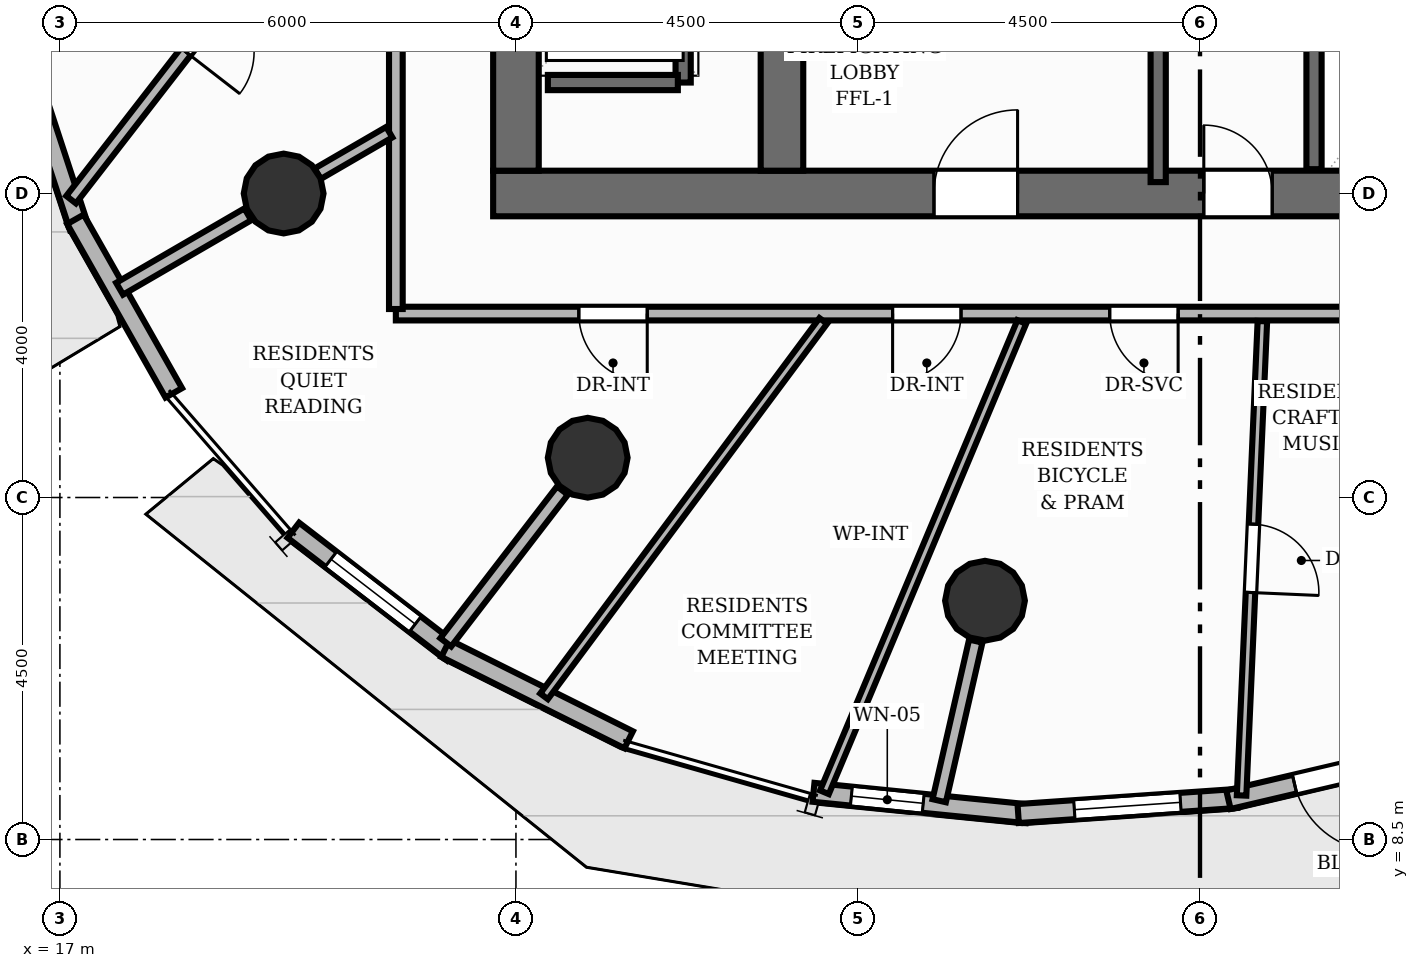
"""IFC4 building model, lengths in metres.
Left out: names, types, materials, properties, quantities, classifications, styles, units other than length and angle.
Written with IfcOpenShell. Run it as: python <this file> out.ifc"""

import sys

from ifc_helpers import new_model, si_unit, direction, frame, frame_2d, origin, origin_2d, place, context, subcontext, project, spatial, rectangle, circle, extrude, element, fill, save


model = new_model("IFC4")
c1 = context("Model", 3, precision=1e-05, world=origin(), true_north=direction((0.0, 1.0)))
c2 = subcontext(c1, "Body", "Model", "MODEL_VIEW")
j1 = project(units=[si_unit("LENGTHUNIT", "METRE"), si_unit("PLANEANGLEUNIT", "RADIAN")], contexts=[c1])
p1 = place(None, origin())
s1 = spatial("IfcSite", under=j1, at=p1, CompositionType="ELEMENT")
p2 = place(p1, origin())
s2 = spatial("IfcBuilding", under=s1, at=p2, CompositionType="ELEMENT")
p3 = place(p2, frame((0.0, 0.0, 148.96)))
s3 = spatial("IfcBuildingStorey", under=s2, at=p3, CompositionType="ELEMENT", Elevation=148.96)
p4 = place(p3, frame((22.7, 17.0, 0.0), z_axis=(0.0, 0.0, 1.0), x_axis=(1.0, 0.0, 0.0)))
e1 = element("IfcWall", 1, at=p4, inside=s3, PredefinedType="SHEAR", context=c2, shape_type="SweptSolid", body=[
    extrude(rectangle(XDim=15.1, YDim=0.6, at=frame_2d((7.55, 0.0))), origin(), (0.0, 0.0, 1.0), 3.2),
])
p5 = place(p4, frame((5.8, 0.0, 0.0)))
e2 = element("IfcOpeningElement", 2, at=p5, cuts=e1, PredefinedType="OPENING", context=c2, shape_type="SweptSolid", body=[
    extrude(rectangle(XDim=1.1, YDim=2.15, at=frame_2d((0.55, 1.075))), frame((0.0, 0.31, 0.0), z_axis=(0.0, -1.0, 0.0), x_axis=(1.0, 0.0, 0.0)), (0.0, 0.0, 1.0), 0.62),
])
p6 = place(p4, frame((9.35, 0.0, 0.0)))
e3 = element("IfcOpeningElement", 3, at=p6, cuts=e1, PredefinedType="OPENING", context=c2, shape_type="SweptSolid", body=[
    extrude(rectangle(XDim=0.9, YDim=2.1, at=frame_2d((0.45, 1.05))), frame((0.0, 0.31, 0.0), z_axis=(0.0, -1.0, 0.0), x_axis=(1.0, 0.0, 0.0)), (0.0, 0.0, 1.0), 0.62),
])
p7 = place(p3, frame((23.0, 17.3, 0.0), z_axis=(0.0, 0.0, 1.0), x_axis=(0.0, 1.0, 0.0)))
e4 = element("IfcWall", 4, at=p7, inside=s3, PredefinedType="SHEAR", context=c2, shape_type="SweptSolid", body=[
    extrude(rectangle(XDim=13.4, YDim=0.6, at=frame_2d((6.7, 0.0))), origin(), (0.0, 0.0, 1.0), 3.2),
])
p8 = place(p7, frame((1.675, 0.0, 0.0)))
e5 = element("IfcOpeningElement", 5, at=p8, cuts=e4, PredefinedType="OPENING", context=c2, shape_type="SweptSolid", body=[
    extrude(rectangle(XDim=1.05, YDim=2.15, at=frame_2d((0.525, 1.075))), frame((0.0, 0.31, 0.0), z_axis=(0.0, -1.0, 0.0), x_axis=(1.0, 0.0, 0.0)), (0.0, 0.0, 1.0), 0.62),
])
p9 = place(p7, frame((6.175, 0.0, 0.0)))
e6 = element("IfcOpeningElement", 6, at=p9, cuts=e4, PredefinedType="OPENING", context=c2, shape_type="SweptSolid", body=[
    extrude(rectangle(XDim=1.05, YDim=2.15, at=frame_2d((0.525, 1.075))), frame((0.0, 0.31, 0.0), z_axis=(0.0, -1.0, 0.0), x_axis=(1.0, 0.0, 0.0)), (0.0, 0.0, 1.0), 0.62),
])
p10 = place(p7, frame((10.675, 0.0, 0.0)))
e7 = element("IfcOpeningElement", 7, at=p10, cuts=e4, PredefinedType="OPENING", context=c2, shape_type="SweptSolid", body=[
    extrude(rectangle(XDim=1.05, YDim=2.15, at=frame_2d((0.525, 1.075))), frame((0.0, 0.31, 0.0), z_axis=(0.0, -1.0, 0.0), x_axis=(1.0, 0.0, 0.0)), (0.0, 0.0, 1.0), 0.62),
])
p11 = place(p3, frame((26.5, 17.3, 0.0), z_axis=(0.0, 0.0, 1.0), x_axis=(0.0, 1.0, 0.0)))
e8 = element("IfcWall", 8, at=p11, inside=s3, PredefinedType="SHEAR", context=c2, shape_type="SweptSolid", body=[
    extrude(rectangle(XDim=13.4, YDim=0.56, at=frame_2d((6.7, 0.0))), origin(), (0.0, 0.0, 1.0), 3.2),
])
for number, where, z_axis, x_axis in (
    (9, (19.944, 17.0, 0.0), (0.0, 0.0, 1.0), (1.0, 0.0, 0.0)),
    (10, (23.944, 13.523, 0.0), (0.0, 0.0, 1.0), (1.0, 0.0, 0.0)),
    (11, (29.171, 11.642, 0.0), (0.0, 0.0, 1.0), (1.0, 0.0, 0.0)),
):
    element("IfcColumn", number, at=place(p3, frame(where, z_axis=z_axis, x_axis=x_axis)), inside=s3, PredefinedType="COLUMN", context=c2, shape_type="SweptSolid", body=[
        extrude(circle(Radius=0.525, at=origin_2d()), origin(), (0.0, 0.0, 1.0), 3.2),
    ])
p12 = place(p3, frame((17.251, 16.556, 0.0), z_axis=(0.0, 0.0, 1.0), x_axis=(-0.311522010952, 0.950238936633, 0.0)))
e12 = element("IfcWall", 12, at=p12, inside=s3, PredefinedType="SOLIDWALL", context=c2, shape_type="SweptSolid", body=[
    extrude(rectangle(XDim=2.648, YDim=0.25, at=frame_2d((1.324, 0.0))), origin(), (0.0, 0.0, 1.0), 2.96),
])
p13 = place(p3, frame((18.498, 14.377, 0.0), z_axis=(0.0, 0.0, 1.0), x_axis=(-0.492909281161, 0.870080709214, 0.0)))
e13 = element("IfcWall", 13, at=p13, inside=s3, PredefinedType="SOLIDWALL", context=c2, shape_type="SweptSolid", body=[
    extrude(rectangle(XDim=2.624, YDim=0.25, at=frame_2d((1.312, 0.0))), origin(), (0.0, 0.0, 1.0), 2.96),
])
p14 = place(p3, frame((22.169, 10.954, 0.0), z_axis=(0.0, 0.0, 1.0), x_axis=(-0.7923805969, 0.610027040103, 0.0)))
e14 = element("IfcWall", 14, at=p14, inside=s3, PredefinedType="SOLIDWALL", context=c2, shape_type="SweptSolid", body=[
    extrude(rectangle(XDim=2.648, YDim=0.25, at=frame_2d((1.324, 0.0))), origin(), (0.0, 0.0, 1.0), 2.96),
])
p15 = place(p14, frame((0.624, 0.0, 0.85)))
e15 = element("IfcOpeningElement", 15, at=p15, cuts=e14, PredefinedType="OPENING", context=c2, shape_type="SweptSolid", body=[
    extrude(rectangle(XDim=1.4, YDim=1.55, at=frame_2d((0.7, 0.775))), frame((0.0, 0.135, 0.0), z_axis=(0.0, -1.0, 0.0), x_axis=(1.0, 0.0, 0.0)), (0.0, 0.0, 1.0), 0.27),
])
p16 = place(p3, frame((24.483, 9.812, 0.0), z_axis=(0.0, 0.0, 1.0), x_axis=(-0.894843809708, 0.446379385979, 0.0)))
e16 = element("IfcWall", 16, at=p16, inside=s3, PredefinedType="SOLIDWALL", context=c2, shape_type="SweptSolid", body=[
    extrude(rectangle(XDim=2.693, YDim=0.25, at=frame_2d((1.347, 0.0))), origin(), (0.0, 0.0, 1.0), 2.96),
])
p17 = place(p3, frame((29.719, 8.84, 0.0), z_axis=(0.0, 0.0, 1.0), x_axis=(-0.995013999105, 0.099735357744, 0.0)))
e17 = element("IfcWall", 17, at=p17, inside=s3, PredefinedType="SOLIDWALL", context=c2, shape_type="SweptSolid", body=[
    extrude(rectangle(XDim=2.818, YDim=0.25, at=frame_2d((1.409, 0.0))), origin(), (0.0, 0.0, 1.0), 2.96),
])
p18 = place(p17, frame((1.367, 0.0, 0.85)))
e18 = element("IfcOpeningElement", 18, at=p18, cuts=e17, PredefinedType="OPENING", context=c2, shape_type="SweptSolid", body=[
    extrude(rectangle(XDim=0.95, YDim=1.45, at=frame_2d((0.475, 0.725))), frame((0.0, 0.135, 0.0), z_axis=(0.0, -1.0, 0.0), x_axis=(1.0, 0.0, 0.0)), (0.0, 0.0, 1.0), 0.27),
])
p19 = place(p3, frame((32.483, 9.04, 0.0), z_axis=(0.0, 0.0, 1.0), x_axis=(-0.997630729469, -0.068796276206, 0.0)))
e19 = element("IfcWall", 19, at=p19, inside=s3, PredefinedType="SOLIDWALL", context=c2, shape_type="SweptSolid", body=[
    extrude(rectangle(XDim=2.882, YDim=0.25, at=frame_2d((1.441, 0.0))), origin(), (0.0, 0.0, 1.0), 2.96),
])
p20 = place(p19, frame((0.741, 0.0, 0.85)))
e20 = element("IfcOpeningElement", 20, at=p20, cuts=e19, PredefinedType="OPENING", context=c2, shape_type="SweptSolid", body=[
    extrude(rectangle(XDim=1.4, YDim=1.55, at=frame_2d((0.7, 0.775))), frame((0.0, 0.135, 0.0), z_axis=(0.0, -1.0, 0.0), x_axis=(1.0, 0.0, 0.0)), (0.0, 0.0, 1.0), 0.27),
])
p21 = place(p3, frame((35.233, 9.695, 0.0), z_axis=(0.0, 0.0, 1.0), x_axis=(-0.973538048261, -0.228524984602, 0.0)))
e21 = element("IfcWall", 21, at=p21, inside=s3, PredefinedType="SOLIDWALL", context=c2, shape_type="SweptSolid", body=[
    extrude(rectangle(XDim=2.937, YDim=0.25, at=frame_2d((1.468, 0.0))), origin(), (0.0, 0.0, 1.0), 2.96),
])
p22 = place(p21, frame((0.893, 0.0, 0.0)))
e22 = element("IfcOpeningElement", 22, at=p22, cuts=e21, PredefinedType="OPENING", context=c2, shape_type="SweptSolid", body=[
    extrude(rectangle(XDim=1.15, YDim=2.2, at=frame_2d((0.575, 1.1))), frame((0.0, 0.135, 0.0), z_axis=(0.0, -1.0, 0.0), x_axis=(1.0, 0.0, 0.0)), (0.0, 0.0, 1.0), 0.27),
])
p23 = place(p3, frame((31.45, 17.15, 0.0), z_axis=(0.0, 0.0, 1.0), x_axis=(0.0, 1.0, 0.0)))
e23 = element("IfcWall", 23, at=p23, inside=s3, PredefinedType="SHEAR", context=c2, shape_type="SweptSolid", body=[
    extrude(rectangle(XDim=3.5, YDim=0.2, at=frame_2d((1.75, 0.0))), origin(), (0.0, 0.0, 1.0), 3.2),
])
p24 = place(p3, frame((25.2, 18.46, 0.0), z_axis=(0.0, 0.0, 1.0), x_axis=(0.0, 1.0, 0.0)))
e24 = element("IfcWall", 24, at=p24, inside=s3, PredefinedType="SHEAR", context=c2, shape_type="SweptSolid", body=[
    extrude(rectangle(XDim=11.08, YDim=0.2, at=frame_2d((5.54, 0.0))), origin(), (0.0, 0.0, 1.0), 3.2),
])
p25 = place(p3, frame((23.42, 18.46, 0.0), z_axis=(0.0, 0.0, 1.0), x_axis=(1.0, 0.0, 0.0)))
e25 = element("IfcWall", 25, at=p25, inside=s3, PredefinedType="SHEAR", context=c2, shape_type="SweptSolid", body=[
    extrude(rectangle(XDim=1.71, YDim=0.2, at=frame_2d((0.855, 0.0))), origin(), (0.0, 0.0, 1.0), 3.2),
])
p26 = place(p3, frame((33.5, 17.32, 0.0), z_axis=(0.0, 0.0, 1.0), x_axis=(0.0, 1.0, 0.0)))
e26 = element("IfcWall", 26, at=p26, inside=s3, PredefinedType="SHEAR", context=c2, shape_type="SweptSolid", body=[
    extrude(rectangle(XDim=1.86, YDim=0.2, at=frame_2d((0.93, 0.0))), origin(), (0.0, 0.0, 1.0), 3.2),
])
p27 = place(p3, frame((19.472, 16.726, 0.0), z_axis=(0.0, 0.0, 1.0), x_axis=(-0.864802971131, -0.502111363268, 0.0)))
e27 = element("IfcWall", 27, at=p27, inside=s3, PredefinedType="PARTITIONING", context=c2, shape_type="SweptSolid", body=[
    extrude(rectangle(XDim=1.951, YDim=0.18, at=frame_2d((0.975, 0.0))), origin(), (0.0, 0.0, 1.0), 2.336),
])
p28 = place(p3, frame((23.612, 13.092, 0.0), z_axis=(0.0, 0.0, 1.0), x_axis=(-0.609556175004, -0.792742877303, 0.0)))
e28 = element("IfcWall", 28, at=p28, inside=s3, PredefinedType="PARTITIONING", context=c2, shape_type="SweptSolid", body=[
    extrude(rectangle(XDim=2.519, YDim=0.18, at=frame_2d((1.259, 0.0))), origin(), (0.0, 0.0, 1.0), 2.336),
])
p29 = place(p3, frame((29.05, 11.111, 0.0), z_axis=(0.0, 0.0, 1.0), x_axis=(-0.223080127706, -0.974800111111, 0.0)))
e29 = element("IfcWall", 29, at=p29, inside=s3, PredefinedType="PARTITIONING", context=c2, shape_type="SweptSolid", body=[
    extrude(rectangle(XDim=2.155, YDim=0.18, at=frame_2d((1.077, 0.0))), origin(), (0.0, 0.0, 1.0), 2.336),
])
p30 = place(p3, frame((39.08, 15.42, 0.0), z_axis=(0.0, 0.0, 1.0), x_axis=(-1.0, 0.0, 0.0)))
e30 = element("IfcWall", 30, at=p30, inside=s3, PredefinedType="PARTITIONING", context=c2, shape_type="SweptSolid", body=[
    extrude(rectangle(XDim=17.66, YDim=0.18, at=frame_2d((8.83, 0.0))), origin(), (0.0, 0.0, 1.0), 2.955),
])
p31 = place(p30, frame((7.368, 0.0, 0.0)))
e31 = element("IfcOpeningElement", 31, at=p31, cuts=e30, PredefinedType="OPENING", context=c2, shape_type="SweptSolid", body=[
    extrude(rectangle(XDim=0.9, YDim=2.1, at=frame_2d((0.45, 1.05))), frame((0.0, 0.1, 0.0), z_axis=(0.0, -1.0, 0.0), x_axis=(1.0, 0.0, 0.0)), (0.0, 0.0, 1.0), 0.2),
])
p32 = place(p30, frame((10.224, 0.0, 0.0)))
e32 = element("IfcOpeningElement", 32, at=p32, cuts=e30, PredefinedType="OPENING", context=c2, shape_type="SweptSolid", body=[
    extrude(rectangle(XDim=0.9, YDim=2.1, at=frame_2d((0.45, 1.05))), frame((0.0, 0.1, 0.0), z_axis=(0.0, -1.0, 0.0), x_axis=(1.0, 0.0, 0.0)), (0.0, 0.0, 1.0), 0.2),
])
p33 = place(p30, frame((14.353, 0.0, 0.0)))
e33 = element("IfcOpeningElement", 33, at=p33, cuts=e30, PredefinedType="OPENING", context=c2, shape_type="SweptSolid", body=[
    extrude(rectangle(XDim=0.9, YDim=2.1, at=frame_2d((0.45, 1.05))), frame((0.0, 0.1, 0.0), z_axis=(0.0, -1.0, 0.0), x_axis=(1.0, 0.0, 0.0)), (0.0, 0.0, 1.0), 0.2),
])
p34 = place(p3, frame((21.42, 15.48, 0.0), z_axis=(0.0, 0.0, 1.0), x_axis=(0.0, 1.0, 0.0)))
e34 = element("IfcWall", 34, at=p34, inside=s3, PredefinedType="PARTITIONING", context=c2, shape_type="SweptSolid", body=[
    extrude(rectangle(XDim=6.12, YDim=0.18, at=frame_2d((3.06, 0.0))), origin(), (0.0, 0.0, 1.0), 2.955),
])
p35 = place(p3, frame((27.059, 9.122, 0.0), z_axis=(0.0, 0.0, 1.0), x_axis=(0.386926287161, 0.922110648623, 0.0)))
e35 = element("IfcWall", 35, at=p35, inside=s3, PredefinedType="PARTITIONING", context=c2, shape_type="SweptSolid", body=[
    extrude(rectangle(XDim=6.71, YDim=0.125, at=frame_2d((3.355, 0.0))), origin(), (0.0, 0.0, 1.0), 2.955),
])
p36 = place(p3, frame((32.821, 15.32, 0.0), z_axis=(0.0, 0.0, 1.0), x_axis=(-0.043813760095, -0.999039716141, 0.0)))
e36 = element("IfcWall", 36, at=p36, inside=s3, PredefinedType="PARTITIONING", context=c2, shape_type="SweptSolid", body=[
    extrude(rectangle(XDim=6.247, YDim=0.125, at=frame_2d((3.123, 0.0))), origin(), (0.0, 0.0, 1.0), 2.692),
])
p37 = place(p36, frame((2.673, 0.0, 0.0)))
e37 = element("IfcOpeningElement", 37, at=p37, cuts=e36, PredefinedType="OPENING", context=c2, shape_type="SweptSolid", body=[
    extrude(rectangle(XDim=0.9, YDim=2.1, at=frame_2d((0.45, 1.05))), frame((0.0, 0.073, 0.0), z_axis=(0.0, -1.0, 0.0), x_axis=(1.0, 0.0, 0.0)), (0.0, 0.0, 1.0), 0.145),
])
p38 = place(p3, frame((23.37, 10.384, 0.0), z_axis=(0.0, 0.0, 1.0), x_axis=(0.596726995384, 0.802444323913, 0.0)))
e38 = element("IfcWall", 38, at=p38, inside=s3, PredefinedType="PARTITIONING", context=c2, shape_type="SweptSolid", body=[
    extrude(rectangle(XDim=6.156, YDim=0.125, at=frame_2d((3.078, 0.0))), origin(), (0.0, 0.0, 1.0), 2.692),
])
p39 = place(p3, frame((20.391, 17.26, 0.0), z_axis=(0.0, 0.0, 1.0), x_axis=(0.864719901707, 0.50225440923, 0.0)))
e39 = element("IfcWall", 39, at=p39, inside=s3, PredefinedType="PLUMBINGWALL", context=c2, shape_type="SweptSolid", body=[
    extrude(rectangle(XDim=1.09, YDim=0.16, at=frame_2d((0.545, 0.0))), origin(), (0.0, 0.0, 1.0), 2.336),
])
p40 = place(p3, frame((20.714, 21.521, 0.0), z_axis=(0.0, 0.0, 1.0), x_axis=(-0.612572320399, -0.790414544578, 0.0)))
e40 = element("IfcWall", 40, at=p40, inside=s3, PredefinedType="PLUMBINGWALL", context=c2, shape_type="SweptSolid", body=[
    extrude(rectangle(XDim=5.822, YDim=0.16, at=frame_2d((2.911, 0.0))), origin(), (0.0, 0.0, 1.0), 2.955),
])
p41 = place(p40, frame((2.461, 0.0, 0.0)))
e41 = element("IfcOpeningElement", 41, at=p41, cuts=e40, PredefinedType="OPENING", context=c2, shape_type="SweptSolid", body=[
    extrude(rectangle(XDim=0.9, YDim=2.1, at=frame_2d((0.45, 1.05))), frame((0.0, 0.09, 0.0), z_axis=(0.0, -1.0, 0.0), x_axis=(1.0, 0.0, 0.0)), (0.0, 0.0, 1.0), 0.18),
])
p42 = place(p22, origin())
e42 = element("IfcDoor", 42, at=p42, inside=s3, OperationType="SINGLE_SWING_LEFT", PredefinedType="DOOR", context=c2, shape_type="SweptSolid", body=[
    extrude(rectangle(XDim=1.15, YDim=2.2, at=frame_2d((0.575, 1.1))), frame((0.0, 0.025, 0.0), z_axis=(0.0, -1.0, 0.0), x_axis=(1.0, 0.0, 0.0)), (0.0, 0.0, 1.0), 0.05),
])
fill(e22, e42)
p43 = place(p15, origin())
e43 = element("IfcWindow", 43, at=p43, inside=s3, PartitioningType="SINGLE_PANEL", PredefinedType="WINDOW", context=c2, shape_type="SweptSolid", body=[
    extrude(rectangle(XDim=1.4, YDim=1.55, at=frame_2d((0.7, 0.775))), frame((0.0, 0.03, 0.0), z_axis=(0.0, -1.0, 0.0), x_axis=(1.0, 0.0, 0.0)), (0.0, 0.0, 1.0), 0.06),
])
fill(e15, e43)
p44 = place(p18, origin())
e44 = element("IfcWindow", 44, at=p44, inside=s3, PartitioningType="SINGLE_PANEL", PredefinedType="WINDOW", context=c2, shape_type="SweptSolid", body=[
    extrude(rectangle(XDim=0.95, YDim=1.45, at=frame_2d((0.475, 0.725))), frame((0.0, 0.03, 0.0), z_axis=(0.0, -1.0, 0.0), x_axis=(1.0, 0.0, 0.0)), (0.0, 0.0, 1.0), 0.06),
])
fill(e18, e44)
p45 = place(p20, origin())
e45 = element("IfcWindow", 45, at=p45, inside=s3, PartitioningType="SINGLE_PANEL", PredefinedType="WINDOW", context=c2, shape_type="SweptSolid", body=[
    extrude(rectangle(XDim=1.4, YDim=1.55, at=frame_2d((0.7, 0.775))), frame((0.0, 0.03, 0.0), z_axis=(0.0, -1.0, 0.0), x_axis=(1.0, 0.0, 0.0)), (0.0, 0.0, 1.0), 0.06),
])
fill(e20, e45)
p46 = place(p5, origin())
e46 = element("IfcDoor", 46, at=p46, inside=s3, OperationType="SINGLE_SWING_RIGHT", PredefinedType="DOOR", context=c2, shape_type="SweptSolid", body=[
    extrude(rectangle(XDim=1.1, YDim=2.15, at=frame_2d((0.55, 1.075))), frame((0.0, 0.025, 0.0), z_axis=(0.0, -1.0, 0.0), x_axis=(1.0, 0.0, 0.0)), (0.0, 0.0, 1.0), 0.05),
])
fill(e2, e46)
p47 = place(p6, origin())
e47 = element("IfcDoor", 47, at=p47, inside=s3, OperationType="SINGLE_SWING_LEFT", PredefinedType="DOOR", context=c2, shape_type="SweptSolid", body=[
    extrude(rectangle(XDim=0.9, YDim=2.1, at=frame_2d((0.45, 1.05))), frame((0.0, 0.025, 0.0), z_axis=(0.0, -1.0, 0.0), x_axis=(1.0, 0.0, 0.0)), (0.0, 0.0, 1.0), 0.05),
])
fill(e3, e47)
p48 = place(p31, origin())
e48 = element("IfcDoor", 48, at=p48, inside=s3, OperationType="SINGLE_SWING_LEFT", PredefinedType="DOOR", context=c2, shape_type="SweptSolid", body=[
    extrude(rectangle(XDim=0.9, YDim=2.1, at=frame_2d((0.45, 1.05))), frame((0.0, 0.025, 0.0), z_axis=(0.0, -1.0, 0.0), x_axis=(1.0, 0.0, 0.0)), (0.0, 0.0, 1.0), 0.05),
])
fill(e31, e48)
p49 = place(p32, origin())
e49 = element("IfcDoor", 49, at=p49, inside=s3, OperationType="SINGLE_SWING_RIGHT", PredefinedType="DOOR", context=c2, shape_type="SweptSolid", body=[
    extrude(rectangle(XDim=0.9, YDim=2.1, at=frame_2d((0.45, 1.05))), frame((0.0, 0.025, 0.0), z_axis=(0.0, -1.0, 0.0), x_axis=(1.0, 0.0, 0.0)), (0.0, 0.0, 1.0), 0.05),
])
fill(e32, e49)
p50 = place(p33, origin())
e50 = element("IfcDoor", 50, at=p50, inside=s3, OperationType="SINGLE_SWING_LEFT", PredefinedType="DOOR", context=c2, shape_type="SweptSolid", body=[
    extrude(rectangle(XDim=0.9, YDim=2.1, at=frame_2d((0.45, 1.05))), frame((0.0, 0.025, 0.0), z_axis=(0.0, -1.0, 0.0), x_axis=(1.0, 0.0, 0.0)), (0.0, 0.0, 1.0), 0.05),
])
fill(e33, e50)
p51 = place(p37, origin())
e51 = element("IfcDoor", 51, at=p51, inside=s3, OperationType="SINGLE_SWING_RIGHT", PredefinedType="DOOR", context=c2, shape_type="SweptSolid", body=[
    extrude(rectangle(XDim=0.9, YDim=2.1, at=frame_2d((0.45, 1.05))), frame((0.0, 0.025, 0.0), z_axis=(0.0, -1.0, 0.0), x_axis=(1.0, 0.0, 0.0)), (0.0, 0.0, 1.0), 0.05),
])
fill(e37, e51)
p52 = place(p41, origin())
e52 = element("IfcDoor", 52, at=p52, inside=s3, OperationType="SINGLE_SWING_RIGHT", PredefinedType="DOOR", context=c2, shape_type="SweptSolid", body=[
    extrude(rectangle(XDim=0.9, YDim=2.1, at=frame_2d((0.45, 1.05))), frame((0.0, 0.025, 0.0), z_axis=(0.0, -1.0, 0.0), x_axis=(1.0, 0.0, 0.0)), (0.0, 0.0, 1.0), 0.05),
])
fill(e41, e52)
save(model, sys.argv[1])
